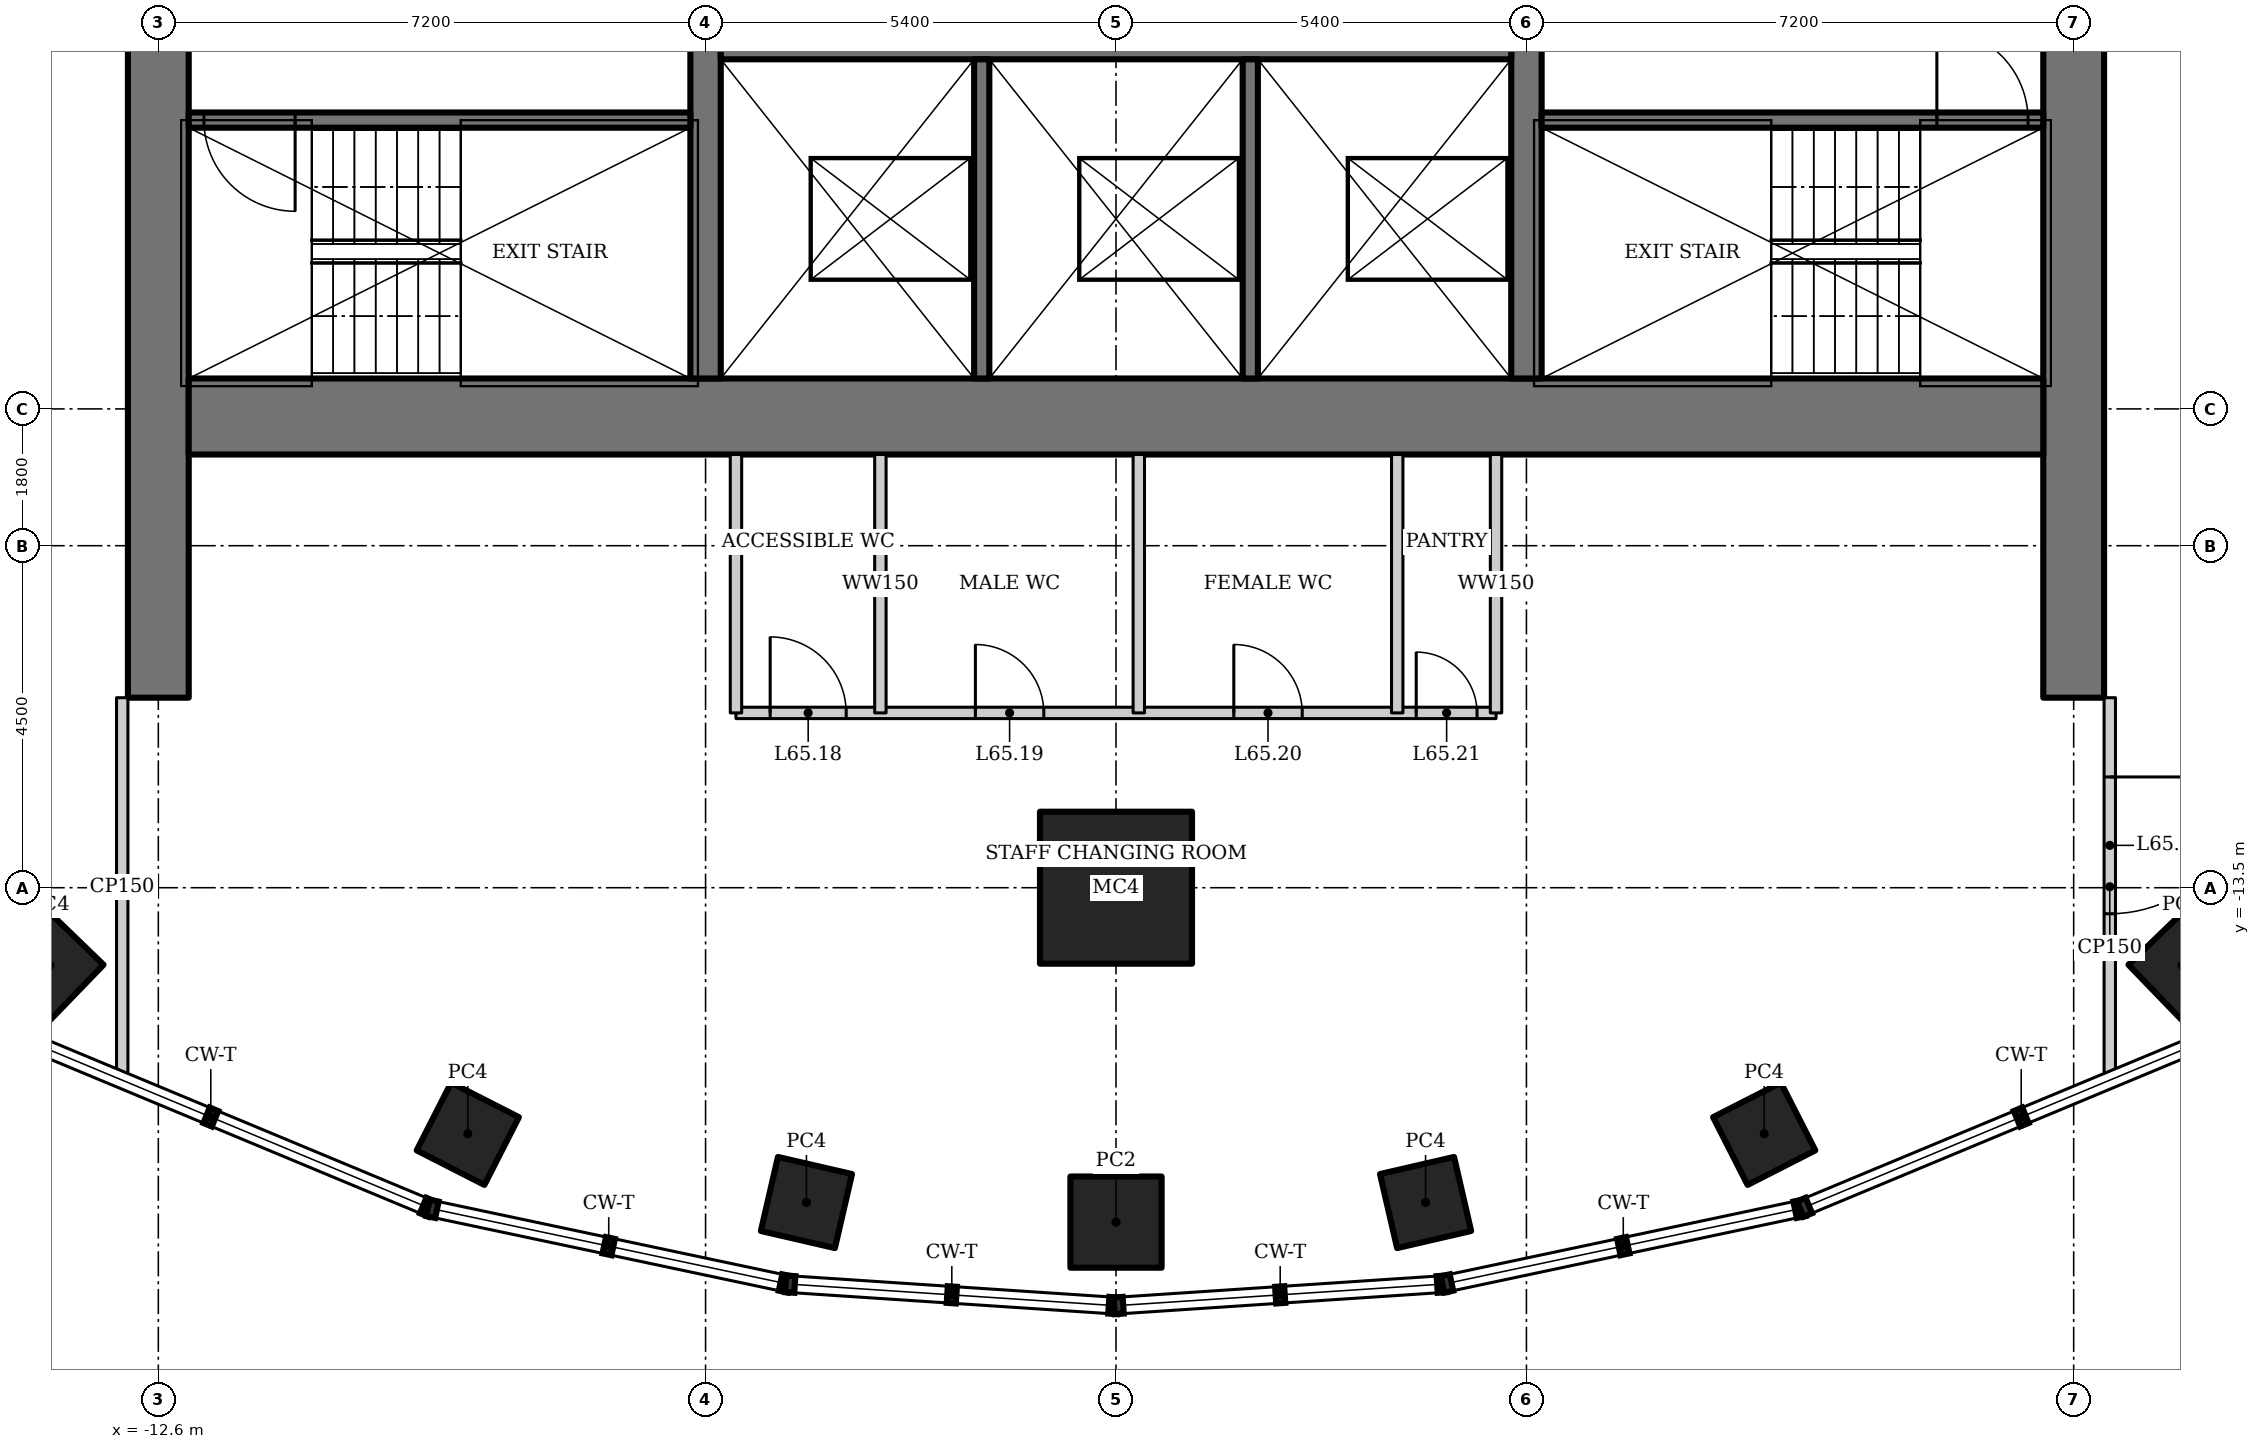
"""IFC4 building model, lengths in metres.
Left out: names, types, materials, properties, quantities, classifications, styles, units other than length and angle.
Written with IfcOpenShell. Run it as: python <this file> out.ifc"""

import sys

from ifc_helpers import new_model, si_unit, direction, frame, frame_2d, origin, origin_2d, place, context, subcontext, project, spatial, rectangle, hollow_rectangle, extrude, element, fill, save


model = new_model("IFC4")
c1 = context("Model", 3, precision=1e-05, world=origin(), true_north=direction((0.0, 1.0)))
c2 = subcontext(c1, "Body", "Model", "MODEL_VIEW")
j1 = project(units=[si_unit("LENGTHUNIT", "METRE"), si_unit("PLANEANGLEUNIT", "RADIAN")], contexts=[c1])
p1 = place(None, origin())
s1 = spatial("IfcSite", under=j1, at=p1, CompositionType="ELEMENT")
p2 = place(p1, origin())
s2 = spatial("IfcBuilding", under=s1, at=p2, CompositionType="ELEMENT")
p3 = place(p2, frame((0.0, 0.0, 279.4)))
s3 = spatial("IfcBuildingStorey", under=s2, at=p3, CompositionType="ELEMENT", Elevation=279.4)
p4 = place(p3, frame((0.0, -13.5, 0.0), z_axis=(0.0, 0.0, 1.0), x_axis=(1.0, 0.0, 0.0)))
e1 = element("IfcColumn", 1, at=p4, inside=s3, PredefinedType="COLUMN", context=c2, shape_type="SweptSolid", body=[
    extrude(hollow_rectangle(XDim=2.0, YDim=2.0, WallThickness=0.15, at=origin_2d()), origin(), (0.0, 0.0, 1.0), 5.0),
])
for number, where, z_axis, x_axis in (
    (2, (-14.028, -14.526, 0.0), (0.0, 0.0, 1.0), (0.695, 0.719, 0.0)),
    (3, (-8.528, -16.738, 0.0), (0.0, 0.0, 1.0), (0.454, 0.891, 0.0)),
    (4, (-4.073, -17.642, 0.0), (0.0, 0.0, 1.0), (0.225, 0.974, 0.0)),
):
    element("IfcColumn", number, at=place(p3, frame(where, z_axis=z_axis, x_axis=x_axis)), inside=s3, PredefinedType="COLUMN", context=c2, shape_type="SweptSolid", body=[
        extrude(hollow_rectangle(XDim=1.0, YDim=1.0, WallThickness=0.08, at=origin_2d()), origin(), (0.0, 0.0, 1.0), 5.0),
    ])
p5 = place(p3, frame((0.0, -17.9, 0.0), z_axis=(0.0, 0.0, 1.0), x_axis=(1.0, 0.0, 0.0)))
e5 = element("IfcColumn", 5, at=p5, inside=s3, PredefinedType="COLUMN", context=c2, shape_type="SweptSolid", body=[
    extrude(hollow_rectangle(XDim=1.2, YDim=1.2, WallThickness=0.1, at=origin_2d()), origin(), (0.0, 0.0, 1.0), 5.0),
])
for number, where, z_axis, x_axis in (
    (6, (4.073, -17.642, 0.0), (0.0, 0.0, 1.0), (0.974, 0.225, 0.0)),
    (7, (8.528, -16.738, 0.0), (0.0, 0.0, 1.0), (0.891, 0.454, 0.0)),
    (8, (14.028, -14.526, 0.0), (0.0, 0.0, 1.0), (0.719, 0.695, 0.0)),
):
    element("IfcColumn", number, at=place(p3, frame(where, z_axis=z_axis, x_axis=x_axis)), inside=s3, PredefinedType="COLUMN", context=c2, shape_type="SweptSolid", body=[
        extrude(hollow_rectangle(XDim=1.0, YDim=1.0, WallThickness=0.08, at=origin_2d()), origin(), (0.0, 0.0, 1.0), 5.0),
    ])
p6 = place(p3, frame((12.6, -11.0, 0.0), z_axis=(0.0, 0.0, 1.0), x_axis=(0.0, 1.0, 0.0)))
e9 = element("IfcWall", 9, at=p6, inside=s3, PredefinedType="SHEAR", context=c2, shape_type="SweptSolid", body=[
    extrude(rectangle(XDim=22.0, YDim=0.8, at=frame_2d((11.0, 0.0))), origin(), (0.0, 0.0, 1.0), 5.0),
])
p7 = place(p6, frame((10.1, 0.0, 0.0)))
e10 = element("IfcOpeningElement", 10, at=p7, cuts=e9, PredefinedType="OPENING", context=c2, shape_type="SweptSolid", body=[
    extrude(rectangle(XDim=1.8, YDim=2.1, at=frame_2d((0.9, 1.05))), frame((0.0, 0.41, 0.0), z_axis=(0.0, -1.0, 0.0), x_axis=(1.0, 0.0, 0.0)), (0.0, 0.0, 1.0), 0.82),
])
p8 = place(p3, frame((-12.6, 11.0, 0.0), z_axis=(0.0, 0.0, 1.0), x_axis=(0.0, -1.0, 0.0)))
e11 = element("IfcWall", 11, at=p8, inside=s3, PredefinedType="SHEAR", context=c2, shape_type="SweptSolid", body=[
    extrude(rectangle(XDim=22.0, YDim=0.8, at=frame_2d((11.0, 0.0))), origin(), (0.0, 0.0, 1.0), 5.0),
])
p9 = place(p8, frame((10.1, 0.0, 0.0)))
e12 = element("IfcOpeningElement", 12, at=p9, cuts=e11, PredefinedType="OPENING", context=c2, shape_type="SweptSolid", body=[
    extrude(rectangle(XDim=1.8, YDim=2.1, at=frame_2d((0.9, 1.05))), frame((0.0, 0.41, 0.0), z_axis=(0.0, -1.0, 0.0), x_axis=(1.0, 0.0, 0.0)), (0.0, 0.0, 1.0), 0.82),
])
p10 = place(p3, frame((-12.2, -7.3, 0.0), z_axis=(0.0, 0.0, 1.0), x_axis=(1.0, 0.0, 0.0)))
e13 = element("IfcWall", 13, at=p10, inside=s3, PredefinedType="SHEAR", context=c2, shape_type="SweptSolid", body=[
    extrude(rectangle(XDim=24.4, YDim=1.0, at=frame_2d((12.2, 0.0))), origin(), (0.0, 0.0, 1.0), 5.0),
])
p11 = place(p3, frame((5.4, -6.8, 0.0), z_axis=(0.0, 0.0, 1.0), x_axis=(0.0, 1.0, 0.0)))
e14 = element("IfcWall", 14, at=p11, inside=s3, PredefinedType="SHEAR", context=c2, shape_type="SweptSolid", body=[
    extrude(rectangle(XDim=14.6, YDim=0.4, at=frame_2d((7.3, 0.0))), origin(), (0.0, 0.0, 1.0), 5.0),
])
p12 = place(p11, frame((5.9, 0.0, 0.0)))
e15 = element("IfcOpeningElement", 15, at=p12, cuts=e14, PredefinedType="OPENING", context=c2, shape_type="SweptSolid", body=[
    extrude(rectangle(XDim=1.8, YDim=2.1, at=frame_2d((0.9, 1.05))), frame((0.0, 0.21, 0.0), z_axis=(0.0, -1.0, 0.0), x_axis=(1.0, 0.0, 0.0)), (0.0, 0.0, 1.0), 0.42),
])
p13 = place(p3, frame((-5.4, 7.8, 0.0), z_axis=(0.0, 0.0, 1.0), x_axis=(0.0, -1.0, 0.0)))
e16 = element("IfcWall", 16, at=p13, inside=s3, PredefinedType="SHEAR", context=c2, shape_type="SweptSolid", body=[
    extrude(rectangle(XDim=14.6, YDim=0.4, at=frame_2d((7.3, 0.0))), origin(), (0.0, 0.0, 1.0), 5.0),
])
p14 = place(p13, frame((6.4, 0.0, 0.0)))
e17 = element("IfcOpeningElement", 17, at=p14, cuts=e16, PredefinedType="OPENING", context=c2, shape_type="SweptSolid", body=[
    extrude(rectangle(XDim=1.8, YDim=2.1, at=frame_2d((0.9, 1.05))), frame((0.0, 0.21, 0.0), z_axis=(0.0, -1.0, 0.0), x_axis=(1.0, 0.0, 0.0)), (0.0, 0.0, 1.0), 0.42),
])
p15 = place(p3, frame((-5.2, -2.4, 0.0), z_axis=(0.0, 0.0, 1.0), x_axis=(1.0, 0.0, 0.0)))
e18 = element("IfcWall", 18, at=p15, inside=s3, PredefinedType="SHEAR", context=c2, shape_type="SweptSolid", body=[
    extrude(rectangle(XDim=10.4, YDim=0.4, at=frame_2d((5.2, 0.0))), origin(), (0.0, 0.0, 1.0), 5.0),
])
p16 = place(p15, frame((1.683, 0.0, 0.0)))
e19 = element("IfcOpeningElement", 19, at=p16, cuts=e18, PredefinedType="OPENING", context=c2, shape_type="SweptSolid", body=[
    extrude(rectangle(XDim=1.1, YDim=2.2, at=frame_2d((0.55, 1.1))), frame((0.0, 0.21, 0.0), z_axis=(0.0, -1.0, 0.0), x_axis=(1.0, 0.0, 0.0)), (0.0, 0.0, 1.0), 0.42),
])
p17 = place(p15, frame((5.217, 0.0, 0.0)))
e20 = element("IfcOpeningElement", 20, at=p17, cuts=e18, PredefinedType="OPENING", context=c2, shape_type="SweptSolid", body=[
    extrude(rectangle(XDim=1.1, YDim=2.2, at=frame_2d((0.55, 1.1))), frame((0.0, 0.21, 0.0), z_axis=(0.0, -1.0, 0.0), x_axis=(1.0, 0.0, 0.0)), (0.0, 0.0, 1.0), 0.42),
])
p18 = place(p15, frame((8.75, 0.0, 0.0)))
e21 = element("IfcOpeningElement", 21, at=p18, cuts=e18, PredefinedType="OPENING", context=c2, shape_type="SweptSolid", body=[
    extrude(rectangle(XDim=1.1, YDim=2.2, at=frame_2d((0.55, 1.1))), frame((0.0, 0.21, 0.0), z_axis=(0.0, -1.0, 0.0), x_axis=(1.0, 0.0, 0.0)), (0.0, 0.0, 1.0), 0.42),
])
for number, where, z_axis, x_axis in (
    (22, (-1.767, -2.6, 0.0), (0.0, 0.0, 1.0), (0.0, -1.0, 0.0)),
    (23, (1.767, -2.6, 0.0), (0.0, 0.0, 1.0), (0.0, -1.0, 0.0)),
):
    element("IfcWall", number, at=place(p3, frame(where, z_axis=z_axis, x_axis=x_axis)), inside=s3, PredefinedType="SOLIDWALL", context=c2, shape_type="SweptSolid", body=[
        extrude(rectangle(XDim=4.2, YDim=0.2, at=frame_2d((2.1, 0.0))), origin(), (0.0, 0.0, 1.0), 5.0),
    ])
p19 = place(p3, frame((5.6, -3.4, 0.0), z_axis=(0.0, 0.0, 1.0), x_axis=(1.0, 0.0, 0.0)))
e24 = element("IfcWall", 24, at=p19, inside=s3, PredefinedType="SHEAR", context=c2, shape_type="SweptSolid", body=[
    extrude(rectangle(XDim=6.6, YDim=0.2, at=frame_2d((3.3, 0.0))), origin(), (0.0, 0.0, 1.0), 5.0),
])
p20 = place(p19, frame((5.2, 0.0, 0.0)))
e25 = element("IfcOpeningElement", 25, at=p20, cuts=e24, PredefinedType="OPENING", context=c2, shape_type="SweptSolid", body=[
    extrude(rectangle(XDim=1.2, YDim=2.1, at=frame_2d((0.6, 1.05))), frame((0.0, 0.11, 0.0), z_axis=(0.0, -1.0, 0.0), x_axis=(1.0, 0.0, 0.0)), (0.0, 0.0, 1.0), 0.22),
])
p21 = place(p3, frame((-5.6, -3.4, 0.0), z_axis=(0.0, 0.0, 1.0), x_axis=(-1.0, 0.0, 0.0)))
e26 = element("IfcWall", 26, at=p21, inside=s3, PredefinedType="SHEAR", context=c2, shape_type="SweptSolid", body=[
    extrude(rectangle(XDim=6.6, YDim=0.2, at=frame_2d((3.3, 0.0))), origin(), (0.0, 0.0, 1.0), 5.0),
])
p22 = place(p21, frame((5.2, 0.0, 0.0)))
e27 = element("IfcOpeningElement", 27, at=p22, cuts=e26, PredefinedType="OPENING", context=c2, shape_type="SweptSolid", body=[
    extrude(rectangle(XDim=1.2, YDim=2.1, at=frame_2d((0.6, 1.05))), frame((0.0, 0.11, 0.0), z_axis=(0.0, -1.0, 0.0), x_axis=(1.0, 0.0, 0.0)), (0.0, 0.0, 1.0), 0.22),
])
p23 = place(p3, frame((-13.075, -11.0, 0.0), z_axis=(0.0, 0.0, 1.0), x_axis=(0.0, -1.0, 0.0)))
e28 = element("IfcWall", 28, at=p23, inside=s3, PredefinedType="PARTITIONING", context=c2, shape_type="SweptSolid", body=[
    extrude(rectangle(XDim=4.974, YDim=0.15, at=frame_2d((2.487, 0.0))), origin(), (0.0, 0.0, 1.0), 4.8),
])
p24 = place(p3, frame((13.075, -11.0, 0.0), z_axis=(0.0, 0.0, 1.0), x_axis=(0.0, -1.0, 0.0)))
e29 = element("IfcWall", 29, at=p24, inside=s3, PredefinedType="PARTITIONING", context=c2, shape_type="SweptSolid", body=[
    extrude(rectangle(XDim=4.974, YDim=0.15, at=frame_2d((2.487, 0.0))), origin(), (0.0, 0.0, 1.0), 4.8),
])
p25 = place(p24, frame((1.043, 0.0, 0.0)))
e30 = element("IfcOpeningElement", 30, at=p25, cuts=e29, PredefinedType="OPENING", context=c2, shape_type="SweptSolid", body=[
    extrude(rectangle(XDim=1.8, YDim=2.1, at=frame_2d((0.9, 1.05))), frame((0.0, 0.085, 0.0), z_axis=(0.0, -1.0, 0.0), x_axis=(1.0, 0.0, 0.0)), (0.0, 0.0, 1.0), 0.17),
])
p26 = place(p3, frame((-5.0, -11.2, 0.0), z_axis=(0.0, 0.0, 1.0), x_axis=(1.0, 0.0, 0.0)))
e31 = element("IfcWall", 31, at=p26, inside=s3, PredefinedType="SOLIDWALL", context=c2, shape_type="SweptSolid", body=[
    extrude(rectangle(XDim=10.0, YDim=0.15, at=frame_2d((5.0, 0.0))), origin(), (0.0, 0.0, 1.0), 4.8),
])
p27 = place(p26, frame((0.45, 0.0, 0.0)))
e32 = element("IfcOpeningElement", 32, at=p27, cuts=e31, PredefinedType="OPENING", context=c2, shape_type="SweptSolid", body=[
    extrude(rectangle(XDim=1.0, YDim=2.1, at=frame_2d((0.5, 1.05))), frame((0.0, 0.085, 0.0), z_axis=(0.0, -1.0, 0.0), x_axis=(1.0, 0.0, 0.0)), (0.0, 0.0, 1.0), 0.17),
])
p28 = place(p26, frame((3.15, 0.0, 0.0)))
e33 = element("IfcOpeningElement", 33, at=p28, cuts=e31, PredefinedType="OPENING", context=c2, shape_type="SweptSolid", body=[
    extrude(rectangle(XDim=0.9, YDim=2.1, at=frame_2d((0.45, 1.05))), frame((0.0, 0.085, 0.0), z_axis=(0.0, -1.0, 0.0), x_axis=(1.0, 0.0, 0.0)), (0.0, 0.0, 1.0), 0.17),
])
p29 = place(p26, frame((6.55, 0.0, 0.0)))
e34 = element("IfcOpeningElement", 34, at=p29, cuts=e31, PredefinedType="OPENING", context=c2, shape_type="SweptSolid", body=[
    extrude(rectangle(XDim=0.9, YDim=2.1, at=frame_2d((0.45, 1.05))), frame((0.0, 0.085, 0.0), z_axis=(0.0, -1.0, 0.0), x_axis=(1.0, 0.0, 0.0)), (0.0, 0.0, 1.0), 0.17),
])
p30 = place(p26, frame((8.95, 0.0, 0.0)))
e35 = element("IfcOpeningElement", 35, at=p30, cuts=e31, PredefinedType="OPENING", context=c2, shape_type="SweptSolid", body=[
    extrude(rectangle(XDim=0.8, YDim=2.1, at=frame_2d((0.4, 1.05))), frame((0.0, 0.085, 0.0), z_axis=(0.0, -1.0, 0.0), x_axis=(1.0, 0.0, 0.0)), (0.0, 0.0, 1.0), 0.17),
])
for number, where, z_axis, x_axis in (
    (36, (-5.0, -7.8, 0.0), (0.0, 0.0, 1.0), (0.0, -1.0, 0.0)),
    (37, (5.0, -7.8, 0.0), (0.0, 0.0, 1.0), (0.0, -1.0, 0.0)),
    (38, (-3.1, -7.8, 0.0), (0.0, 0.0, 1.0), (0.0, -1.0, 0.0)),
):
    element("IfcWall", number, at=place(p3, frame(where, z_axis=z_axis, x_axis=x_axis)), inside=s3, PredefinedType="SOLIDWALL", context=c2, shape_type="SweptSolid", body=[
        extrude(rectangle(XDim=3.4, YDim=0.15, at=frame_2d((1.7, 0.0))), origin(), (0.0, 0.0, 1.0), 4.8),
    ])
p31 = place(p3, frame((0.3, -7.8, 0.0), z_axis=(0.0, 0.0, 1.0), x_axis=(0.0, -1.0, 0.0)))
e39 = element("IfcWall", 39, at=p31, inside=s3, PredefinedType="SOLIDWALL", context=c2, shape_type="SweptSolid", body=[
    extrude(rectangle(XDim=3.4, YDim=0.15, at=frame_2d((1.7, 0.0))), origin(), (0.0, 0.0, 1.0), 3.6),
])
p32 = place(p3, frame((3.7, -7.8, 0.0), z_axis=(0.0, 0.0, 1.0), x_axis=(0.0, -1.0, 0.0)))
e40 = element("IfcWall", 40, at=p32, inside=s3, PredefinedType="SOLIDWALL", context=c2, shape_type="SweptSolid", body=[
    extrude(rectangle(XDim=3.4, YDim=0.15, at=frame_2d((1.7, 0.0))), origin(), (0.0, 0.0, 1.0), 4.8),
])
p33 = place(p20, origin())
e41 = element("IfcDoor", 41, at=p33, inside=s3, OperationType="SINGLE_SWING_RIGHT", PredefinedType="DOOR", context=c2, shape_type="SweptSolid", body=[
    extrude(rectangle(XDim=1.2, YDim=2.1, at=frame_2d((0.6, 1.05))), frame((0.0, 0.025, 0.0), z_axis=(0.0, -1.0, 0.0), x_axis=(1.0, 0.0, 0.0)), (0.0, 0.0, 1.0), 0.05),
])
fill(e25, e41)
p34 = place(p22, origin())
e42 = element("IfcDoor", 42, at=p34, inside=s3, OperationType="SINGLE_SWING_RIGHT", PredefinedType="DOOR", context=c2, shape_type="SweptSolid", body=[
    extrude(rectangle(XDim=1.2, YDim=2.1, at=frame_2d((0.6, 1.05))), frame((0.0, 0.025, 0.0), z_axis=(0.0, -1.0, 0.0), x_axis=(1.0, 0.0, 0.0)), (0.0, 0.0, 1.0), 0.05),
])
fill(e27, e42)
p35 = place(p27, origin())
e43 = element("IfcDoor", 43, at=p35, inside=s3, OperationType="SINGLE_SWING_LEFT", PredefinedType="DOOR", context=c2, shape_type="SweptSolid", body=[
    extrude(rectangle(XDim=1.0, YDim=2.1, at=frame_2d((0.5, 1.05))), frame((0.0, 0.025, 0.0), z_axis=(0.0, -1.0, 0.0), x_axis=(1.0, 0.0, 0.0)), (0.0, 0.0, 1.0), 0.05),
])
fill(e32, e43)
p36 = place(p28, origin())
e44 = element("IfcDoor", 44, at=p36, inside=s3, OperationType="SINGLE_SWING_LEFT", PredefinedType="DOOR", context=c2, shape_type="SweptSolid", body=[
    extrude(rectangle(XDim=0.9, YDim=2.1, at=frame_2d((0.45, 1.05))), frame((0.0, 0.025, 0.0), z_axis=(0.0, -1.0, 0.0), x_axis=(1.0, 0.0, 0.0)), (0.0, 0.0, 1.0), 0.05),
])
fill(e33, e44)
p37 = place(p29, origin())
e45 = element("IfcDoor", 45, at=p37, inside=s3, OperationType="SINGLE_SWING_LEFT", PredefinedType="DOOR", context=c2, shape_type="SweptSolid", body=[
    extrude(rectangle(XDim=0.9, YDim=2.1, at=frame_2d((0.45, 1.05))), frame((0.0, 0.025, 0.0), z_axis=(0.0, -1.0, 0.0), x_axis=(1.0, 0.0, 0.0)), (0.0, 0.0, 1.0), 0.05),
])
fill(e34, e45)
p38 = place(p30, origin())
e46 = element("IfcDoor", 46, at=p38, inside=s3, OperationType="SINGLE_SWING_LEFT", PredefinedType="DOOR", context=c2, shape_type="SweptSolid", body=[
    extrude(rectangle(XDim=0.8, YDim=2.1, at=frame_2d((0.4, 1.05))), frame((0.0, 0.025, 0.0), z_axis=(0.0, -1.0, 0.0), x_axis=(1.0, 0.0, 0.0)), (0.0, 0.0, 1.0), 0.05),
])
fill(e35, e46)
p39 = place(p25, origin())
e47 = element("IfcDoor", 47, at=p39, inside=s3, OperationType="DOUBLE_DOOR_DOUBLE_SWING", PredefinedType="DOOR", context=c2, shape_type="SweptSolid", body=[
    extrude(rectangle(XDim=1.8, YDim=2.1, at=frame_2d((0.9, 1.05))), frame((0.0, 0.025, 0.0), z_axis=(0.0, -1.0, 0.0), x_axis=(1.0, 0.0, 0.0)), (0.0, 0.0, 1.0), 0.05),
])
fill(e30, e47)
save(model, sys.argv[1])
